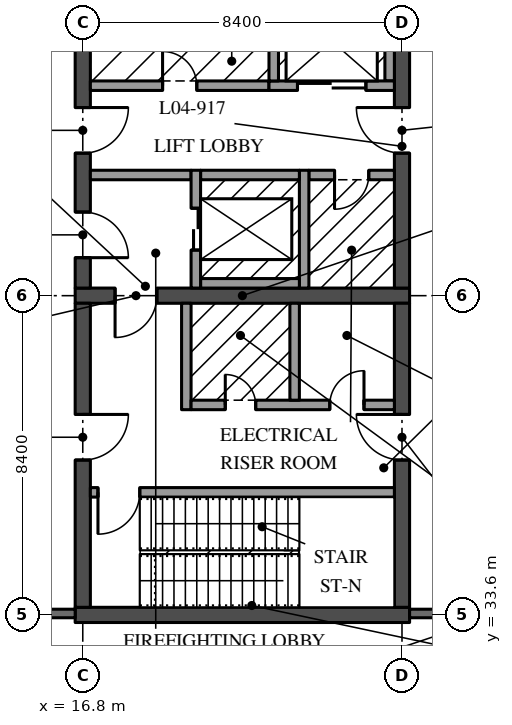
"""IFC4 building model, lengths in metres.
Left out: names, types, materials, properties, quantities, classifications, styles, units other than length and angle.
Written with IfcOpenShell. Run it as: python <this file> out.ifc"""

import sys

from ifc_helpers import new_model, si_unit, direction, frame, frame_2d, origin, place, context, subcontext, project, spatial, rectangle, extrude, element, fill, save


model = new_model("IFC4")
c1 = context("Model", 3, precision=1e-05, world=origin(), true_north=direction((0.0, 1.0)))
c2 = subcontext(c1, "Body", "Model", "MODEL_VIEW")
j1 = project(units=[si_unit("LENGTHUNIT", "METRE"), si_unit("PLANEANGLEUNIT", "RADIAN")], contexts=[c1])
p1 = place(None, origin())
s1 = spatial("IfcSite", under=j1, at=p1, CompositionType="ELEMENT")
p2 = place(p1, origin())
s2 = spatial("IfcBuilding", under=s1, at=p2, CompositionType="ELEMENT")
p3 = place(p2, frame((0.0, 0.0, 18.9)))
s3 = spatial("IfcBuildingStorey", under=s2, at=p3, CompositionType="ELEMENT", Elevation=18.9)
p4 = place(p3, frame((16.6, 42.0, 0.0), z_axis=(0.0, 0.0, 1.0), x_axis=(1.0, 0.0, 0.0)))
e1 = element("IfcWall", 1, at=p4, inside=s3, PredefinedType="SHEAR", context=c2, shape_type="SweptSolid", body=[
    extrude(rectangle(XDim=8.8, YDim=0.4, at=frame_2d((4.4, 0.0))), origin(), (0.0, 0.0, 1.0), 4.37),
])
p5 = place(p4, frame((1.05, 0.0, 0.0)))
e2 = element("IfcOpeningElement", 2, at=p5, cuts=e1, PredefinedType="OPENING", context=c2, shape_type="SweptSolid", body=[
    extrude(rectangle(XDim=1.1, YDim=2.1, at=frame_2d((0.55, 1.05))), frame((0.0, 0.21, 0.0), z_axis=(0.0, -1.0, 0.0), x_axis=(1.0, 0.0, 0.0)), (0.0, 0.0, 1.0), 0.42),
])
p6 = place(p3, frame((16.8, 42.2, 0.0), z_axis=(0.0, 0.0, 1.0), x_axis=(0.0, 1.0, 0.0)))
e3 = element("IfcWall", 3, at=p6, inside=s3, PredefinedType="SHEAR", context=c2, shape_type="SweptSolid", body=[
    extrude(rectangle(XDim=8.0, YDim=0.4, at=frame_2d((4.0, 0.0))), origin(), (0.0, 0.0, 1.0), 4.37),
])
p7 = place(p6, frame((3.55, 0.0, 0.0)))
e4 = element("IfcOpeningElement", 4, at=p7, cuts=e3, PredefinedType="OPENING", context=c2, shape_type="SweptSolid", body=[
    extrude(rectangle(XDim=1.2, YDim=2.1, at=frame_2d((0.6, 1.05))), frame((0.0, 0.21, 0.0), z_axis=(0.0, -1.0, 0.0), x_axis=(1.0, 0.0, 0.0)), (0.0, 0.0, 1.0), 0.42),
])
p8 = place(p6, frame((0.8, 0.0, 0.0)))
e5 = element("IfcOpeningElement", 5, at=p8, cuts=e3, PredefinedType="OPENING", context=c2, shape_type="SweptSolid", body=[
    extrude(rectangle(XDim=1.2, YDim=2.1, at=frame_2d((0.6, 1.05))), frame((0.0, 0.21, 0.0), z_axis=(0.0, -1.0, 0.0), x_axis=(1.0, 0.0, 0.0)), (0.0, 0.0, 1.0), 0.42),
])
p9 = place(p3, frame((25.2, 42.2, 0.0), z_axis=(0.0, 0.0, 1.0), x_axis=(0.0, 1.0, 0.0)))
e6 = element("IfcWall", 6, at=p9, inside=s3, PredefinedType="SHEAR", context=c2, shape_type="SweptSolid", body=[
    extrude(rectangle(XDim=8.0, YDim=0.4, at=frame_2d((4.0, 0.0))), origin(), (0.0, 0.0, 1.0), 4.37),
])
p10 = place(p9, frame((3.55, 0.0, 0.0)))
e7 = element("IfcOpeningElement", 7, at=p10, cuts=e6, PredefinedType="OPENING", context=c2, shape_type="SweptSolid", body=[
    extrude(rectangle(XDim=1.2, YDim=2.1, at=frame_2d((0.6, 1.05))), frame((0.0, 0.21, 0.0), z_axis=(0.0, -1.0, 0.0), x_axis=(1.0, 0.0, 0.0)), (0.0, 0.0, 1.0), 0.42),
])
p11 = place(p3, frame((21.7, 47.525, 0.0), z_axis=(0.0, 0.0, 1.0), x_axis=(-1.0, 0.0, 0.0)))
e8 = element("IfcWall", 8, at=p11, inside=s3, PredefinedType="SOLIDWALL", context=c2, shape_type="SweptSolid", body=[
    extrude(rectangle(XDim=4.7, YDim=0.25, at=frame_2d((2.35, 0.0))), origin(), (0.0, 0.0, 1.0), 4.37),
])
p12 = place(p11, frame((1.9, 0.0, 0.0)))
e9 = element("IfcOpeningElement", 9, at=p12, cuts=e8, PredefinedType="OPENING", context=c2, shape_type="SweptSolid", body=[
    extrude(rectangle(XDim=0.9, YDim=2.1, at=frame_2d((0.45, 1.05))), frame((0.0, 0.135, 0.0), z_axis=(0.0, -1.0, 0.0), x_axis=(1.0, 0.0, 0.0)), (0.0, 0.0, 1.0), 0.27),
])
p13 = place(p3, frame((25.0, 45.175, 0.0), z_axis=(0.0, 0.0, 1.0), x_axis=(-1.0, 0.0, 0.0)))
e10 = element("IfcWall", 10, at=p13, inside=s3, PredefinedType="SOLIDWALL", context=c2, shape_type="SweptSolid", body=[
    extrude(rectangle(XDim=2.25, YDim=0.25, at=frame_2d((1.125, 0.0))), origin(), (0.0, 0.0, 1.0), 4.37),
])
p14 = place(p13, frame((0.675, 0.0, 0.0)))
e11 = element("IfcOpeningElement", 11, at=p14, cuts=e10, PredefinedType="OPENING", context=c2, shape_type="SweptSolid", body=[
    extrude(rectangle(XDim=0.9, YDim=2.1, at=frame_2d((0.45, 1.05))), frame((0.0, 0.135, 0.0), z_axis=(0.0, -1.0, 0.0), x_axis=(1.0, 0.0, 0.0)), (0.0, 0.0, 1.0), 0.27),
])
p15 = place(p3, frame((19.65, 45.175, 0.0), z_axis=(0.0, 0.0, 1.0), x_axis=(-1.0, 0.0, 0.0)))
e12 = element("IfcWall", 12, at=p15, inside=s3, PredefinedType="SOLIDWALL", context=c2, shape_type="SweptSolid", body=[
    extrude(rectangle(XDim=2.65, YDim=0.25, at=frame_2d((1.325, 0.0))), origin(), (0.0, 0.0, 1.0), 4.37),
])
p16 = place(p3, frame((16.6, 33.6, 0.0), z_axis=(0.0, 0.0, 1.0), x_axis=(1.0, 0.0, 0.0)))
e13 = element("IfcWall", 13, at=p16, inside=s3, PredefinedType="SHEAR", context=c2, shape_type="SweptSolid", body=[
    extrude(rectangle(XDim=8.8, YDim=0.4, at=frame_2d((4.4, 0.0))), origin(), (0.0, 0.0, 1.0), 4.37),
])
p17 = place(p3, frame((16.8, 33.8, 0.0), z_axis=(0.0, 0.0, 1.0), x_axis=(0.0, 1.0, 0.0)))
e14 = element("IfcWall", 14, at=p17, inside=s3, PredefinedType="SHEAR", context=c2, shape_type="SweptSolid", body=[
    extrude(rectangle(XDim=8.0, YDim=0.4, at=frame_2d((4.0, 0.0))), origin(), (0.0, 0.0, 1.0), 4.37),
])
p18 = place(p17, frame((3.875, 0.0, 0.0)))
e15 = element("IfcOpeningElement", 15, at=p18, cuts=e14, PredefinedType="OPENING", context=c2, shape_type="SweptSolid", body=[
    extrude(rectangle(XDim=1.2, YDim=2.1, at=frame_2d((0.6, 1.05))), frame((0.0, 0.21, 0.0), z_axis=(0.0, -1.0, 0.0), x_axis=(1.0, 0.0, 0.0)), (0.0, 0.0, 1.0), 0.42),
])
p19 = place(p3, frame((25.2, 33.8, 0.0), z_axis=(0.0, 0.0, 1.0), x_axis=(0.0, 1.0, 0.0)))
e16 = element("IfcWall", 16, at=p19, inside=s3, PredefinedType="SHEAR", context=c2, shape_type="SweptSolid", body=[
    extrude(rectangle(XDim=8.0, YDim=0.4, at=frame_2d((4.0, 0.0))), origin(), (0.0, 0.0, 1.0), 4.37),
])
p20 = place(p19, frame((3.875, 0.0, 0.0)))
e17 = element("IfcOpeningElement", 17, at=p20, cuts=e16, PredefinedType="OPENING", context=c2, shape_type="SweptSolid", body=[
    extrude(rectangle(XDim=1.2, YDim=2.1, at=frame_2d((0.6, 1.05))), frame((0.0, 0.21, 0.0), z_axis=(0.0, -1.0, 0.0), x_axis=(1.0, 0.0, 0.0)), (0.0, 0.0, 1.0), 0.42),
])
p21 = place(p3, frame((17.0, 36.825, 0.0), z_axis=(0.0, 0.0, 1.0), x_axis=(1.0, 0.0, 0.0)))
e18 = element("IfcWall", 18, at=p21, inside=s3, PredefinedType="SOLIDWALL", context=c2, shape_type="SweptSolid", body=[
    extrude(rectangle(XDim=8.0, YDim=0.25, at=frame_2d((4.0, 0.0))), origin(), (0.0, 0.0, 1.0), 4.37),
])
p22 = place(p21, frame((0.2, 0.0, 0.0)))
e19 = element("IfcOpeningElement", 19, at=p22, cuts=e18, PredefinedType="OPENING", context=c2, shape_type="SweptSolid", body=[
    extrude(rectangle(XDim=1.1, YDim=2.1, at=frame_2d((0.55, 1.05))), frame((0.0, 0.135, 0.0), z_axis=(0.0, -1.0, 0.0), x_axis=(1.0, 0.0, 0.0)), (0.0, 0.0, 1.0), 0.27),
])
p23 = place(p3, frame((19.525, 39.0, 0.0), z_axis=(0.0, 0.0, 1.0), x_axis=(0.0, 1.0, 0.0)))
e20 = element("IfcWall", 20, at=p23, inside=s3, PredefinedType="SOLIDWALL", context=c2, shape_type="SweptSolid", body=[
    extrude(rectangle(XDim=2.8, YDim=0.25, at=frame_2d((1.4, 0.0))), origin(), (0.0, 0.0, 1.0), 4.37),
])
p24 = place(p3, frame((19.65, 39.125, 0.0), z_axis=(0.0, 0.0, 1.0), x_axis=(1.0, 0.0, 0.0)))
e21 = element("IfcWall", 21, at=p24, inside=s3, PredefinedType="SOLIDWALL", context=c2, shape_type="SweptSolid", body=[
    extrude(rectangle(XDim=5.35, YDim=0.25, at=frame_2d((2.675, 0.0))), origin(), (0.0, 0.0, 1.0), 4.37),
])
p25 = place(p24, frame((3.65, 0.0, 0.0)))
e22 = element("IfcOpeningElement", 22, at=p25, cuts=e21, PredefinedType="OPENING", context=c2, shape_type="SweptSolid", body=[
    extrude(rectangle(XDim=0.9, YDim=2.1, at=frame_2d((0.45, 1.05))), frame((0.0, 0.135, 0.0), z_axis=(0.0, -1.0, 0.0), x_axis=(1.0, 0.0, 0.0)), (0.0, 0.0, 1.0), 0.27),
])
p26 = place(p24, frame((0.9, 0.0, 0.0)))
e23 = element("IfcOpeningElement", 23, at=p26, cuts=e21, PredefinedType="OPENING", context=c2, shape_type="SweptSolid", body=[
    extrude(rectangle(XDim=0.8, YDim=2.1, at=frame_2d((0.4, 1.05))), frame((0.0, 0.135, 0.0), z_axis=(0.0, -1.0, 0.0), x_axis=(1.0, 0.0, 0.0)), (0.0, 0.0, 1.0), 0.27),
])
p27 = place(p3, frame((22.375, 39.25, 0.0), z_axis=(0.0, 0.0, 1.0), x_axis=(0.0, 1.0, 0.0)))
e24 = element("IfcWall", 24, at=p27, inside=s3, PredefinedType="SOLIDWALL", context=c2, shape_type="SweptSolid", body=[
    extrude(rectangle(XDim=2.55, YDim=0.25, at=frame_2d((1.275, 0.0))), origin(), (0.0, 0.0, 1.0), 4.37),
])
p28 = place(p3, frame((24.875, 47.65, 0.0), z_axis=(0.0, 0.0, 1.0), x_axis=(0.0, 1.0, 0.0)))
e25 = element("IfcWall", 25, at=p28, inside=s3, PredefinedType="SOLIDWALL", context=c2, shape_type="SweptSolid", body=[
    extrude(rectangle(XDim=2.3, YDim=0.25, at=frame_2d((1.15, 0.0))), origin(), (0.0, 0.0, 1.0), 4.37),
])
p29 = place(p3, frame((21.7, 47.525, 0.0), z_axis=(0.0, 0.0, 1.0), x_axis=(1.0, 0.0, 0.0)))
e26 = element("IfcWall", 26, at=p29, inside=s3, PredefinedType="SOLIDWALL", context=c2, shape_type="SweptSolid", body=[
    extrude(rectangle(XDim=3.3, YDim=0.25, at=frame_2d((1.65, 0.0))), origin(), (0.0, 0.0, 1.0), 4.37),
])
p30 = place(p29, frame((0.75, 0.0, 0.0)))
e27 = element("IfcOpeningElement", 27, at=p30, cuts=e26, PredefinedType="OPENING", context=c2, shape_type="SweptSolid", body=[
    extrude(rectangle(XDim=1.8, YDim=2.1, at=frame_2d((0.9, 1.05))), frame((0.0, 0.135, 0.0), z_axis=(0.0, -1.0, 0.0), x_axis=(1.0, 0.0, 0.0)), (0.0, 0.0, 1.0), 0.27),
])
p31 = place(p3, frame((21.825, 47.65, 0.0), z_axis=(0.0, 0.0, 1.0), x_axis=(0.0, 1.0, 0.0)))
e28 = element("IfcWall", 28, at=p31, inside=s3, PredefinedType="SOLIDWALL", context=c2, shape_type="SweptSolid", body=[
    extrude(rectangle(XDim=2.3, YDim=0.25, at=frame_2d((1.15, 0.0))), origin(), (0.0, 0.0, 1.0), 4.37),
])
p32 = place(p3, frame((22.625, 42.2, 0.0), z_axis=(0.0, 0.0, 1.0), x_axis=(0.0, 1.0, 0.0)))
e29 = element("IfcWall", 29, at=p32, inside=s3, PredefinedType="SOLIDWALL", context=c2, shape_type="SweptSolid", body=[
    extrude(rectangle(XDim=3.1, YDim=0.25, at=frame_2d((1.55, 0.0))), origin(), (0.0, 0.0, 1.0), 4.37),
])
for number, where, z_axis, x_axis in (
    (30, (19.9, 45.175, 0.0), (0.0, 0.0, 1.0), (1.0, 0.0, 0.0)),
    (31, (19.9, 42.325, 0.0), (0.0, 0.0, 1.0), (1.0, 0.0, 0.0)),
):
    element("IfcWall", number, at=place(p3, frame(where, z_axis=z_axis, x_axis=x_axis)), inside=s3, PredefinedType="SOLIDWALL", context=c2, shape_type="SweptSolid", body=[
        extrude(rectangle(XDim=2.6, YDim=0.25, at=frame_2d((1.3, 0.0))), origin(), (0.0, 0.0, 1.0), 4.37),
    ])
p33 = place(p3, frame((19.775, 42.2, 0.0), z_axis=(0.0, 0.0, 1.0), x_axis=(0.0, 1.0, 0.0)))
e32 = element("IfcWall", 32, at=p33, inside=s3, PredefinedType="SOLIDWALL", context=c2, shape_type="SweptSolid", body=[
    extrude(rectangle(XDim=3.1, YDim=0.25, at=frame_2d((1.55, 0.0))), origin(), (0.0, 0.0, 1.0), 4.37),
])
p34 = place(p33, frame((1.0, 0.0, 0.0)))
e33 = element("IfcOpeningElement", 33, at=p34, cuts=e32, PredefinedType="OPENING", context=c2, shape_type="SweptSolid", body=[
    extrude(rectangle(XDim=1.1, YDim=2.1, at=frame_2d((0.55, 1.05))), frame((0.0, 0.135, 0.0), z_axis=(0.0, -1.0, 0.0), x_axis=(1.0, 0.0, 0.0)), (0.0, 0.0, 1.0), 0.27),
])
p35 = place(p3, frame((8.406, 33.637, 0.0), z_axis=(0.0, 0.0, 1.0), x_axis=(1.0, 0.0, 0.0)))
e34 = element("IfcWall", 34, at=p35, inside=s3, PredefinedType="SOLIDWALL", context=c2, shape_type="SweptSolid", body=[
    extrude(rectangle(XDim=8.195, YDim=0.225, at=frame_2d((4.097, 0.0))), origin(), (0.0, 0.0, 1.0), 3.746),
])
p36 = place(p35, frame((1.594, 0.0, 0.0)))
e35 = element("IfcOpeningElement", 35, at=p36, cuts=e34, PredefinedType="OPENING", context=c2, shape_type="SweptSolid", body=[
    extrude(rectangle(XDim=1.0, YDim=2.4, at=frame_2d((0.5, 1.2))), frame((0.0, 0.123, 0.0), z_axis=(0.0, -1.0, 0.0), x_axis=(1.0, 0.0, 0.0)), (0.0, 0.0, 1.0), 0.245),
])
p37 = place(p3, frame((25.4, 33.637, 0.0), z_axis=(0.0, 0.0, 1.0), x_axis=(1.0, 0.0, 0.0)))
e36 = element("IfcWall", 36, at=p37, inside=s3, PredefinedType="SOLIDWALL", context=c2, shape_type="SweptSolid", body=[
    extrude(rectangle(XDim=8.196, YDim=0.225, at=frame_2d((4.098, 0.0))), origin(), (0.0, 0.0, 1.0), 3.746),
])
p38 = place(p37, frame((4.9, 0.0, 1.5)))
e37 = element("IfcOpeningElement", 37, at=p38, cuts=e36, PredefinedType="OPENING", context=c2, shape_type="SweptSolid", body=[
    extrude(rectangle(XDim=2.4, YDim=0.9, at=frame_2d((1.2, 0.45))), frame((0.0, 0.123, 0.0), z_axis=(0.0, -1.0, 0.0), x_axis=(1.0, 0.0, 0.0)), (0.0, 0.0, 1.0), 0.245),
])
p39 = place(p7, frame((1.2, 0.0, 0.0), z_axis=(0.0, 0.0, 1.0), x_axis=(-1.0, 0.0, 0.0)))
e38 = element("IfcDoor", 38, at=p39, inside=s3, OperationType="SINGLE_SWING_RIGHT", PredefinedType="DOOR", context=c2, shape_type="SweptSolid", body=[
    extrude(rectangle(XDim=1.2, YDim=2.1, at=frame_2d((0.6, 1.05))), frame((0.0, 0.035, 0.0), z_axis=(0.0, -1.0, 0.0), x_axis=(1.0, 0.0, 0.0)), (0.0, 0.0, 1.0), 0.07),
])
fill(e4, e38)
p40 = place(p10, origin())
e39 = element("IfcDoor", 39, at=p40, inside=s3, OperationType="SINGLE_SWING_LEFT", PredefinedType="DOOR", context=c2, shape_type="SweptSolid", body=[
    extrude(rectangle(XDim=1.2, YDim=2.1, at=frame_2d((0.6, 1.05))), frame((0.0, 0.035, 0.0), z_axis=(0.0, -1.0, 0.0), x_axis=(1.0, 0.0, 0.0)), (0.0, 0.0, 1.0), 0.07),
])
fill(e7, e39)
p41 = place(p8, frame((1.2, 0.0, 0.0), z_axis=(0.0, 0.0, 1.0), x_axis=(-1.0, 0.0, 0.0)))
e40 = element("IfcDoor", 40, at=p41, inside=s3, OperationType="SINGLE_SWING_LEFT", PredefinedType="DOOR", context=c2, shape_type="SweptSolid", body=[
    extrude(rectangle(XDim=1.2, YDim=2.1, at=frame_2d((0.6, 1.05))), frame((0.0, 0.035, 0.0), z_axis=(0.0, -1.0, 0.0), x_axis=(1.0, 0.0, 0.0)), (0.0, 0.0, 1.0), 0.07),
])
fill(e5, e40)
p42 = place(p5, frame((1.1, 0.0, 0.0), z_axis=(0.0, 0.0, 1.0), x_axis=(-1.0, 0.0, 0.0)))
e41 = element("IfcDoor", 41, at=p42, inside=s3, OperationType="SINGLE_SWING_LEFT", PredefinedType="DOOR", context=c2, shape_type="SweptSolid", body=[
    extrude(rectangle(XDim=1.1, YDim=2.1, at=frame_2d((0.55, 1.05))), frame((0.0, 0.035, 0.0), z_axis=(0.0, -1.0, 0.0), x_axis=(1.0, 0.0, 0.0)), (0.0, 0.0, 1.0), 0.07),
])
fill(e2, e41)
p43 = place(p12, frame((0.9, 0.0, 0.0), z_axis=(0.0, 0.0, 1.0), x_axis=(-1.0, 0.0, 0.0)))
e42 = element("IfcDoor", 42, at=p43, inside=s3, OperationType="SINGLE_SWING_RIGHT", PredefinedType="DOOR", context=c2, shape_type="SweptSolid", body=[
    extrude(rectangle(XDim=0.9, YDim=2.1, at=frame_2d((0.45, 1.05))), frame((0.0, 0.035, 0.0), z_axis=(0.0, -1.0, 0.0), x_axis=(1.0, 0.0, 0.0)), (0.0, 0.0, 1.0), 0.07),
])
fill(e9, e42)
p44 = place(p14, origin())
e43 = element("IfcDoor", 43, at=p44, inside=s3, OperationType="SINGLE_SWING_LEFT", PredefinedType="DOOR", context=c2, shape_type="SweptSolid", body=[
    extrude(rectangle(XDim=0.9, YDim=2.1, at=frame_2d((0.45, 1.05))), frame((0.0, 0.05, 0.0), z_axis=(0.0, -1.0, 0.0), x_axis=(1.0, 0.0, 0.0)), (0.0, 0.0, 1.0), 0.1),
])
fill(e11, e43)
p45 = place(p25, origin())
e44 = element("IfcDoor", 44, at=p45, inside=s3, OperationType="SINGLE_SWING_LEFT", PredefinedType="DOOR", context=c2, shape_type="SweptSolid", body=[
    extrude(rectangle(XDim=0.9, YDim=2.1, at=frame_2d((0.45, 1.05))), frame((0.0, 0.035, 0.0), z_axis=(0.0, -1.0, 0.0), x_axis=(1.0, 0.0, 0.0)), (0.0, 0.0, 1.0), 0.07),
])
fill(e22, e44)
p46 = place(p18, frame((1.2, 0.0, 0.0), z_axis=(0.0, 0.0, 1.0), x_axis=(-1.0, 0.0, 0.0)))
e45 = element("IfcDoor", 45, at=p46, inside=s3, OperationType="SINGLE_SWING_RIGHT", PredefinedType="DOOR", context=c2, shape_type="SweptSolid", body=[
    extrude(rectangle(XDim=1.2, YDim=2.1, at=frame_2d((0.6, 1.05))), frame((0.0, 0.035, 0.0), z_axis=(0.0, -1.0, 0.0), x_axis=(1.0, 0.0, 0.0)), (0.0, 0.0, 1.0), 0.07),
])
fill(e15, e45)
p47 = place(p20, origin())
e46 = element("IfcDoor", 46, at=p47, inside=s3, OperationType="SINGLE_SWING_LEFT", PredefinedType="DOOR", context=c2, shape_type="SweptSolid", body=[
    extrude(rectangle(XDim=1.2, YDim=2.1, at=frame_2d((0.6, 1.05))), frame((0.0, 0.035, 0.0), z_axis=(0.0, -1.0, 0.0), x_axis=(1.0, 0.0, 0.0)), (0.0, 0.0, 1.0), 0.07),
])
fill(e17, e46)
p48 = place(p26, origin())
e47 = element("IfcDoor", 47, at=p48, inside=s3, OperationType="SINGLE_SWING_RIGHT", PredefinedType="DOOR", context=c2, shape_type="SweptSolid", body=[
    extrude(rectangle(XDim=0.8, YDim=2.1, at=frame_2d((0.4, 1.05))), frame((0.0, 0.035, 0.0), z_axis=(0.0, -1.0, 0.0), x_axis=(1.0, 0.0, 0.0)), (0.0, 0.0, 1.0), 0.07),
])
fill(e23, e47)
p49 = place(p22, frame((1.1, 0.0, 0.0), z_axis=(0.0, 0.0, 1.0), x_axis=(-1.0, 0.0, 0.0)))
e48 = element("IfcDoor", 48, at=p49, inside=s3, OperationType="SINGLE_SWING_LEFT", PredefinedType="DOOR", context=c2, shape_type="SweptSolid", body=[
    extrude(rectangle(XDim=1.1, YDim=2.1, at=frame_2d((0.55, 1.05))), frame((0.0, 0.035, 0.0), z_axis=(0.0, -1.0, 0.0), x_axis=(1.0, 0.0, 0.0)), (0.0, 0.0, 1.0), 0.07),
])
fill(e19, e48)
p50 = place(p30, origin())
e49 = element("IfcDoor", 49, at=p50, inside=s3, OperationType="DOUBLE_DOOR_SLIDING", PredefinedType="DOOR", context=c2, shape_type="SweptSolid", body=[
    extrude(rectangle(XDim=1.8, YDim=2.1, at=frame_2d((0.9, 1.05))), frame((0.0, 0.04, 0.0), z_axis=(0.0, -1.0, 0.0), x_axis=(1.0, 0.0, 0.0)), (0.0, 0.0, 1.0), 0.08),
])
fill(e27, e49)
p51 = place(p34, origin())
e50 = element("IfcDoor", 50, at=p51, inside=s3, OperationType="DOUBLE_DOOR_SLIDING", PredefinedType="DOOR", context=c2, shape_type="SweptSolid", body=[
    extrude(rectangle(XDim=1.1, YDim=2.1, at=frame_2d((0.55, 1.05))), frame((0.0, 0.04, 0.0), z_axis=(0.0, -1.0, 0.0), x_axis=(1.0, 0.0, 0.0)), (0.0, 0.0, 1.0), 0.08),
])
fill(e33, e50)
save(model, sys.argv[1])
